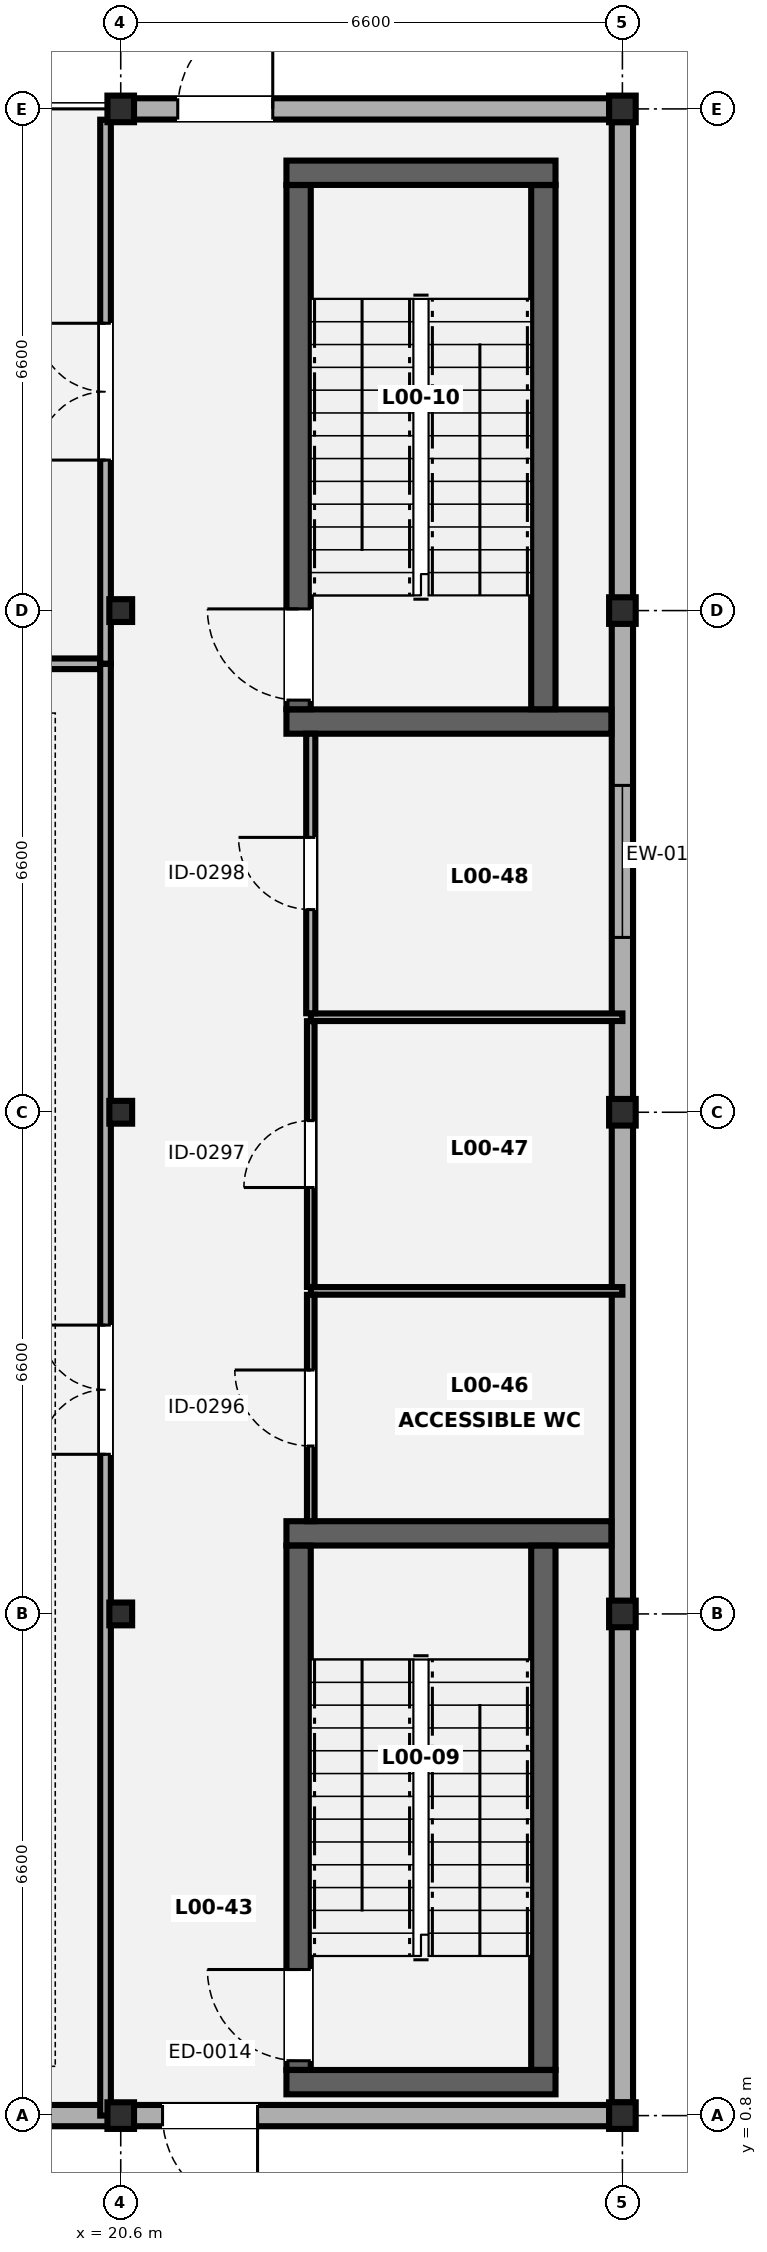
"""IFC4 building model, lengths in metres.
Left out: names, types, materials, properties, quantities, classifications, styles, units other than length and angle.
Written with IfcOpenShell. Run it as: python <this file> out.ifc"""

import sys

from ifc_helpers import new_model, si_unit, direction, frame, frame_2d, origin, origin_2d, place, context, subcontext, project, spatial, rectangle, hollow_rectangle, i_section, extrude, element, fill, save


model = new_model("IFC4")
c1 = context("Model", 3, precision=1e-05, world=origin(), true_north=direction((0.0, 1.0)))
c2 = subcontext(c1, "Body", "Model", "MODEL_VIEW")
j1 = project(units=[si_unit("LENGTHUNIT", "METRE"), si_unit("PLANEANGLEUNIT", "RADIAN")], contexts=[c1])
p1 = place(None, origin())
s1 = spatial("IfcSite", under=j1, at=p1, CompositionType="ELEMENT")
p2 = place(p1, origin())
s2 = spatial("IfcBuilding", under=s1, at=p2, CompositionType="ELEMENT")
p3 = place(p2, origin())
s3 = spatial("IfcBuildingStorey", under=s2, at=p3, CompositionType="ELEMENT", Elevation=0.0)
p4 = place(p3, frame((20.6, 0.8, 0.0), z_axis=(0.0, 0.0, 1.0), x_axis=(1.0, 0.0, 0.0)))
e1 = element("IfcColumn", 1, at=p4, inside=s3, PredefinedType="COLUMN", context=c2, shape_type="SweptSolid", body=[
    extrude(i_section(OverallWidth=0.35, OverallDepth=0.35, WebThickness=0.02, FlangeThickness=0.032, FilletRadius=0.016, at=origin_2d()), origin(), (0.0, 0.0, 1.0), 4.9),
])
for number, where, z_axis, x_axis in (
    (2, (20.6, 7.4, 0.0), (0.0, 0.0, 1.0), (1.0, 0.0, 0.0)),
    (3, (20.6, 14.0, 0.0), (0.0, 0.0, 1.0), (1.0, 0.0, 0.0)),
    (4, (20.6, 20.6, 0.0), (0.0, 0.0, 1.0), (1.0, 0.0, 0.0)),
):
    element("IfcColumn", number, at=place(p3, frame(where, z_axis=z_axis, x_axis=x_axis)), inside=s3, PredefinedType="COLUMN", context=c2, shape_type="SweptSolid", body=[
        extrude(hollow_rectangle(XDim=0.3, YDim=0.3, WallThickness=0.012, at=origin_2d()), origin(), (0.0, 0.0, 1.0), 4.9),
    ])
for number, where, z_axis, x_axis in (
    (5, (20.6, 27.2, 0.0), (0.0, 0.0, 1.0), (1.0, 0.0, 0.0)),
    (6, (27.2, 0.8, 0.0), (0.0, 0.0, 1.0), (1.0, 0.0, 0.0)),
    (7, (27.2, 7.4, 0.0), (0.0, 0.0, 1.0), (1.0, 0.0, 0.0)),
    (8, (27.2, 14.0, 0.0), (0.0, 0.0, 1.0), (1.0, 0.0, 0.0)),
    (9, (27.2, 20.6, 0.0), (0.0, 0.0, 1.0), (1.0, 0.0, 0.0)),
    (10, (27.2, 27.2, 0.0), (0.0, 0.0, 1.0), (1.0, 0.0, 0.0)),
):
    element("IfcColumn", number, at=place(p3, frame(where, z_axis=z_axis, x_axis=x_axis)), inside=s3, PredefinedType="COLUMN", context=c2, shape_type="SweptSolid", body=[
        extrude(i_section(OverallWidth=0.35, OverallDepth=0.35, WebThickness=0.02, FlangeThickness=0.032, FilletRadius=0.016, at=origin_2d()), origin(), (0.0, 0.0, 1.0), 4.9),
    ])
p5 = place(p3, frame((20.773, 27.2, 0.0), z_axis=(0.0, 0.0, 1.0), x_axis=(1.0, 0.0, 0.0)))
e11 = element("IfcWall", 11, at=p5, inside=s3, PredefinedType="SOLIDWALL", context=c2, shape_type="SweptSolid", body=[
    extrude(rectangle(XDim=6.254, YDim=0.28, at=frame_2d((3.127, 0.0))), origin(), (0.0, 0.0, 1.0), 4.205),
])
p6 = place(p5, frame((0.577, 0.0, 0.0)))
e12 = element("IfcOpeningElement", 12, at=p6, cuts=e11, PredefinedType="OPENING", context=c2, shape_type="SweptSolid", body=[
    extrude(rectangle(XDim=1.25, YDim=2.15, at=frame_2d((0.625, 1.075))), frame((0.0, 0.15, 0.0), z_axis=(0.0, -1.0, 0.0), x_axis=(1.0, 0.0, 0.0)), (0.0, 0.0, 1.0), 0.3),
])
p7 = place(p3, frame((27.2, 27.027, 0.0), z_axis=(0.0, 0.0, 1.0), x_axis=(0.0, -1.0, 0.0)))
e13 = element("IfcWall", 13, at=p7, inside=s3, PredefinedType="SOLIDWALL", context=c2, shape_type="SweptSolid", body=[
    extrude(rectangle(XDim=26.054, YDim=0.28, at=frame_2d((13.027, 0.0))), origin(), (0.0, 0.0, 1.0), 4.145),
])
p8 = place(p7, frame((8.727, 0.0, 0.85)))
e14 = element("IfcOpeningElement", 14, at=p8, cuts=e13, PredefinedType="OPENING", context=c2, shape_type="SweptSolid", body=[
    extrude(rectangle(XDim=2.0, YDim=1.4, at=frame_2d((1.0, 0.7))), frame((0.0, 0.15, 0.0), z_axis=(0.0, -1.0, 0.0), x_axis=(1.0, 0.0, 0.0)), (0.0, 0.0, 1.0), 0.3),
])
p9 = place(p3, frame((27.027, 0.8, 0.0), z_axis=(0.0, 0.0, 1.0), x_axis=(-1.0, 0.0, 0.0)))
e15 = element("IfcWall", 15, at=p9, inside=s3, PredefinedType="SOLIDWALL", context=c2, shape_type="SweptSolid", body=[
    extrude(rectangle(XDim=26.054, YDim=0.28, at=frame_2d((13.027, 0.0))), origin(), (0.0, 0.0, 1.0), 4.205),
])
p10 = place(p9, frame((4.627, 0.0, 0.0)))
e16 = element("IfcOpeningElement", 16, at=p10, cuts=e15, PredefinedType="OPENING", context=c2, shape_type="SweptSolid", body=[
    extrude(rectangle(XDim=1.25, YDim=2.15, at=frame_2d((0.625, 1.075))), frame((0.0, 0.15, 0.0), z_axis=(0.0, -1.0, 0.0), x_axis=(1.0, 0.0, 0.0)), (0.0, 0.0, 1.0), 0.3),
])
p11 = place(p9, frame((10.0, 0.0, 0.85)))
e17 = element("IfcOpeningElement", 17, at=p11, cuts=e15, PredefinedType="OPENING", context=c2, shape_type="SweptSolid", body=[
    extrude(rectangle(XDim=2.7, YDim=1.35, at=frame_2d((1.35, 0.675))), frame((0.0, 0.15, 0.0), z_axis=(0.0, -1.0, 0.0), x_axis=(1.0, 0.0, 0.0)), (0.0, 0.0, 1.0), 0.3),
])
p12 = place(p9, frame((16.5, 0.0, 0.85)))
e18 = element("IfcOpeningElement", 18, at=p12, cuts=e15, PredefinedType="OPENING", context=c2, shape_type="SweptSolid", body=[
    extrude(rectangle(XDim=2.9, YDim=1.35, at=frame_2d((1.45, 0.675))), frame((0.0, 0.15, 0.0), z_axis=(0.0, -1.0, 0.0), x_axis=(1.0, 0.0, 0.0)), (0.0, 0.0, 1.0), 0.3),
])
p13 = place(p3, frame((22.78, 1.24, 0.0), z_axis=(0.0, 0.0, 1.0), x_axis=(1.0, 0.0, 0.0)))
e19 = element("IfcWall", 19, at=p13, inside=s3, PredefinedType="SHEAR", context=c2, shape_type="SweptSolid", body=[
    extrude(rectangle(XDim=3.54, YDim=0.32, at=frame_2d((1.77, 0.0))), origin(), (0.0, 0.0, 1.0), 4.66),
])
p14 = place(p3, frame((22.78, 8.46, 0.0), z_axis=(0.0, 0.0, 1.0), x_axis=(1.0, 0.0, 0.0)))
e20 = element("IfcWall", 20, at=p14, inside=s3, PredefinedType="SHEAR", context=c2, shape_type="SweptSolid", body=[
    extrude(rectangle(XDim=4.275, YDim=0.32, at=frame_2d((2.137, 0.0))), origin(), (0.0, 0.0, 1.0), 4.66),
])
p15 = place(p3, frame((22.94, 1.402, 0.0), z_axis=(0.0, 0.0, 1.0), x_axis=(0.0, 1.0, 0.0)))
e21 = element("IfcWall", 21, at=p15, inside=s3, PredefinedType="SHEAR", context=c2, shape_type="SweptSolid", body=[
    extrude(rectangle(XDim=6.896, YDim=0.32, at=frame_2d((3.448, 0.0))), origin(), (0.0, 0.0, 1.0), 4.66),
])
p16 = place(p15, frame((0.12, 0.0, 0.0)))
e22 = element("IfcOpeningElement", 22, at=p16, cuts=e21, PredefinedType="OPENING", context=c2, shape_type="SweptSolid", body=[
    extrude(rectangle(XDim=1.2, YDim=2.15, at=frame_2d((0.6, 1.075))), frame((0.0, 0.17, 0.0), z_axis=(0.0, -1.0, 0.0), x_axis=(1.0, 0.0, 0.0)), (0.0, 0.0, 1.0), 0.34),
])
p17 = place(p3, frame((26.16, 1.402, 0.0), z_axis=(0.0, 0.0, 1.0), x_axis=(0.0, 1.0, 0.0)))
e23 = element("IfcWall", 23, at=p17, inside=s3, PredefinedType="SHEAR", context=c2, shape_type="SweptSolid", body=[
    extrude(rectangle(XDim=6.896, YDim=0.32, at=frame_2d((3.448, 0.0))), origin(), (0.0, 0.0, 1.0), 4.66),
])
p18 = place(p3, frame((22.78, 19.14, 0.0), z_axis=(0.0, 0.0, 1.0), x_axis=(1.0, 0.0, 0.0)))
e24 = element("IfcWall", 24, at=p18, inside=s3, PredefinedType="SHEAR", context=c2, shape_type="SweptSolid", body=[
    extrude(rectangle(XDim=4.275, YDim=0.32, at=frame_2d((2.137, 0.0))), origin(), (0.0, 0.0, 1.0), 4.66),
])
p19 = place(p3, frame((22.78, 26.36, 0.0), z_axis=(0.0, 0.0, 1.0), x_axis=(1.0, 0.0, 0.0)))
e25 = element("IfcWall", 25, at=p19, inside=s3, PredefinedType="SHEAR", context=c2, shape_type="SweptSolid", body=[
    extrude(rectangle(XDim=3.54, YDim=0.32, at=frame_2d((1.77, 0.0))), origin(), (0.0, 0.0, 1.0), 4.66),
])
p20 = place(p3, frame((22.94, 19.302, 0.0), z_axis=(0.0, 0.0, 1.0), x_axis=(0.0, 1.0, 0.0)))
e26 = element("IfcWall", 26, at=p20, inside=s3, PredefinedType="SHEAR", context=c2, shape_type="SweptSolid", body=[
    extrude(rectangle(XDim=6.896, YDim=0.32, at=frame_2d((3.448, 0.0))), origin(), (0.0, 0.0, 1.0), 4.66),
])
p21 = place(p20, frame((0.12, 0.0, 0.0)))
e27 = element("IfcOpeningElement", 27, at=p21, cuts=e26, PredefinedType="OPENING", context=c2, shape_type="SweptSolid", body=[
    extrude(rectangle(XDim=1.2, YDim=2.15, at=frame_2d((0.6, 1.075))), frame((0.0, 0.17, 0.0), z_axis=(0.0, -1.0, 0.0), x_axis=(1.0, 0.0, 0.0)), (0.0, 0.0, 1.0), 0.34),
])
p22 = place(p3, frame((26.16, 19.302, 0.0), z_axis=(0.0, 0.0, 1.0), x_axis=(0.0, 1.0, 0.0)))
e28 = element("IfcWall", 28, at=p22, inside=s3, PredefinedType="SHEAR", context=c2, shape_type="SweptSolid", body=[
    extrude(rectangle(XDim=6.896, YDim=0.32, at=frame_2d((3.448, 0.0))), origin(), (0.0, 0.0, 1.0), 4.66),
])
p23 = place(p3, frame((0.8, 19.9, 0.0), z_axis=(0.0, 0.0, 1.0), x_axis=(1.0, 0.0, 0.0)))
e29 = element("IfcWall", 29, at=p23, inside=s3, PredefinedType="PARTITIONING", context=c2, shape_type="SweptSolid", body=[
    extrude(rectangle(XDim=19.6, YDim=0.14, at=frame_2d((9.8, 0.0))), origin(), (0.0, 0.0, 1.0), 4.66),
])
p24 = place(p3, frame((20.4, 0.8, 0.0), z_axis=(0.0, 0.0, 1.0), x_axis=(0.0, 1.0, 0.0)))
e30 = element("IfcWall", 30, at=p24, inside=s3, PredefinedType="PARTITIONING", context=c2, shape_type="SweptSolid", body=[
    extrude(rectangle(XDim=19.1, YDim=0.14, at=frame_2d((9.55, 0.0))), origin(), (0.0, 0.0, 1.0), 4.145),
])
p25 = place(p24, frame((8.7, 0.0, 0.0)))
e31 = element("IfcOpeningElement", 31, at=p25, cuts=e30, PredefinedType="OPENING", context=c2, shape_type="SweptSolid", body=[
    extrude(rectangle(XDim=1.7, YDim=2.2, at=frame_2d((0.85, 1.1))), frame((0.0, 0.08, 0.0), z_axis=(0.0, -1.0, 0.0), x_axis=(1.0, 0.0, 0.0)), (0.0, 0.0, 1.0), 0.16),
])
p26 = place(p3, frame((20.4, 19.902, 0.0), z_axis=(0.0, 0.0, 1.0), x_axis=(0.0, 1.0, 0.0)))
e32 = element("IfcWall", 32, at=p26, inside=s3, PredefinedType="PARTITIONING", context=c2, shape_type="SweptSolid", body=[
    extrude(rectangle(XDim=7.156, YDim=0.14, at=frame_2d((3.578, 0.0))), origin(), (0.0, 0.0, 1.0), 4.145),
])
p27 = place(p26, frame((2.678, 0.0, 0.0)))
e33 = element("IfcOpeningElement", 33, at=p27, cuts=e32, PredefinedType="OPENING", context=c2, shape_type="SweptSolid", body=[
    extrude(rectangle(XDim=1.8, YDim=2.2, at=frame_2d((0.9, 1.1))), frame((0.0, 0.08, 0.0), z_axis=(0.0, -1.0, 0.0), x_axis=(1.0, 0.0, 0.0)), (0.0, 0.0, 1.0), 0.16),
])
p28 = place(p3, frame((23.102, 11.65, 0.0), z_axis=(0.0, 0.0, 1.0), x_axis=(1.0, 0.0, 0.0)))
e34 = element("IfcWall", 34, at=p28, inside=s3, PredefinedType="PARTITIONING", context=c2, shape_type="SweptSolid", body=[
    extrude(rectangle(XDim=4.098, YDim=0.1, at=frame_2d((2.049, 0.0))), origin(), (0.0, 0.0, 1.0), 4.66),
])
p29 = place(p3, frame((23.1, 8.62, 0.0), z_axis=(0.0, 0.0, 1.0), x_axis=(0.0, 1.0, 0.0)))
e35 = element("IfcWall", 35, at=p29, inside=s3, PredefinedType="PARTITIONING", context=c2, shape_type="SweptSolid", body=[
    extrude(rectangle(XDim=2.978, YDim=0.1, at=frame_2d((1.489, 0.0))), origin(), (0.0, 0.0, 1.0), 4.66),
])
p30 = place(p29, frame((0.989, 0.0, 0.0)))
e36 = element("IfcOpeningElement", 36, at=p30, cuts=e35, PredefinedType="OPENING", context=c2, shape_type="SweptSolid", body=[
    extrude(rectangle(XDim=1.0, YDim=2.1, at=frame_2d((0.5, 1.05))), frame((0.0, 0.06, 0.0), z_axis=(0.0, -1.0, 0.0), x_axis=(1.0, 0.0, 0.0)), (0.0, 0.0, 1.0), 0.12),
])
p31 = place(p3, frame((23.102, 15.25, 0.0), z_axis=(0.0, 0.0, 1.0), x_axis=(1.0, 0.0, 0.0)))
e37 = element("IfcWall", 37, at=p31, inside=s3, PredefinedType="PARTITIONING", context=c2, shape_type="SweptSolid", body=[
    extrude(rectangle(XDim=4.098, YDim=0.1, at=frame_2d((2.049, 0.0))), origin(), (0.0, 0.0, 1.0), 4.66),
])
p32 = place(p3, frame((23.1, 11.702, 0.0), z_axis=(0.0, 0.0, 1.0), x_axis=(0.0, 1.0, 0.0)))
e38 = element("IfcWall", 38, at=p32, inside=s3, PredefinedType="PARTITIONING", context=c2, shape_type="SweptSolid", body=[
    extrude(rectangle(XDim=3.496, YDim=0.1, at=frame_2d((1.748, 0.0))), origin(), (0.0, 0.0, 1.0), 4.66),
])
p33 = place(p32, frame((1.308, 0.0, 0.0)))
e39 = element("IfcOpeningElement", 39, at=p33, cuts=e38, PredefinedType="OPENING", context=c2, shape_type="SweptSolid", body=[
    extrude(rectangle(XDim=0.88, YDim=2.08, at=frame_2d((0.44, 1.04))), frame((0.0, 0.06, 0.0), z_axis=(0.0, -1.0, 0.0), x_axis=(1.0, 0.0, 0.0)), (0.0, 0.0, 1.0), 0.12),
])
p34 = place(p3, frame((23.1, 15.302, 0.0), z_axis=(0.0, 0.0, 1.0), x_axis=(0.0, 1.0, 0.0)))
e40 = element("IfcWall", 40, at=p34, inside=s3, PredefinedType="PARTITIONING", context=c2, shape_type="SweptSolid", body=[
    extrude(rectangle(XDim=3.678, YDim=0.12, at=frame_2d((1.839, 0.0))), origin(), (0.0, 0.0, 1.0), 4.66),
])
p35 = place(p34, frame((1.364, 0.0, 0.0)))
e41 = element("IfcOpeningElement", 41, at=p35, cuts=e40, PredefinedType="OPENING", context=c2, shape_type="SweptSolid", body=[
    extrude(rectangle(XDim=0.95, YDim=2.1, at=frame_2d((0.475, 1.05))), frame((0.0, 0.07, 0.0), z_axis=(0.0, -1.0, 0.0), x_axis=(1.0, 0.0, 0.0)), (0.0, 0.0, 1.0), 0.14),
])
p36 = place(p8, origin())
e42 = element("IfcWindow", 42, at=p36, inside=s3, PartitioningType="SINGLE_PANEL", PredefinedType="WINDOW", context=c2, shape_type="SweptSolid", body=[
    extrude(rectangle(XDim=2.0, YDim=1.4, at=frame_2d((1.0, 0.7))), frame((0.0, 0.03, 0.0), z_axis=(0.0, -1.0, 0.0), x_axis=(1.0, 0.0, 0.0)), (0.0, 0.0, 1.0), 0.06),
])
fill(e14, e42)
p37 = place(p10, origin())
e43 = element("IfcDoor", 43, at=p37, inside=s3, OperationType="SINGLE_SWING_LEFT", PredefinedType="DOOR", context=c2, shape_type="SweptSolid", body=[
    extrude(rectangle(XDim=1.25, YDim=2.15, at=frame_2d((0.625, 1.075))), frame((0.0, 0.025, 0.0), z_axis=(0.0, -1.0, 0.0), x_axis=(1.0, 0.0, 0.0)), (0.0, 0.0, 1.0), 0.05),
])
fill(e16, e43)
p38 = place(p6, origin())
e44 = element("IfcDoor", 44, at=p38, inside=s3, OperationType="SINGLE_SWING_RIGHT", PredefinedType="DOOR", context=c2, shape_type="SweptSolid", body=[
    extrude(rectangle(XDim=1.25, YDim=2.15, at=frame_2d((0.625, 1.075))), frame((0.0, 0.025, 0.0), z_axis=(0.0, -1.0, 0.0), x_axis=(1.0, 0.0, 0.0)), (0.0, 0.0, 1.0), 0.05),
])
fill(e12, e44)
p39 = place(p16, origin())
e45 = element("IfcDoor", 45, at=p39, inside=s3, OperationType="SINGLE_SWING_RIGHT", PredefinedType="DOOR", context=c2, shape_type="SweptSolid", body=[
    extrude(rectangle(XDim=1.2, YDim=2.15, at=frame_2d((0.6, 1.075))), frame((0.0, 0.025, 0.0), z_axis=(0.0, -1.0, 0.0), x_axis=(1.0, 0.0, 0.0)), (0.0, 0.0, 1.0), 0.05),
])
fill(e22, e45)
p40 = place(p21, origin())
e46 = element("IfcDoor", 46, at=p40, inside=s3, OperationType="SINGLE_SWING_RIGHT", PredefinedType="DOOR", context=c2, shape_type="SweptSolid", body=[
    extrude(rectangle(XDim=1.2, YDim=2.15, at=frame_2d((0.6, 1.075))), frame((0.0, 0.025, 0.0), z_axis=(0.0, -1.0, 0.0), x_axis=(1.0, 0.0, 0.0)), (0.0, 0.0, 1.0), 0.05),
])
fill(e27, e46)
p41 = place(p25, origin())
e47 = element("IfcDoor", 47, at=p41, inside=s3, OperationType="DOUBLE_DOOR_SINGLE_SWING", PredefinedType="DOOR", context=c2, shape_type="SweptSolid", body=[
    extrude(rectangle(XDim=1.7, YDim=2.2, at=frame_2d((0.85, 1.1))), frame((0.0, 0.025, 0.0), z_axis=(0.0, -1.0, 0.0), x_axis=(1.0, 0.0, 0.0)), (0.0, 0.0, 1.0), 0.05),
])
fill(e31, e47)
p42 = place(p27, origin())
e48 = element("IfcDoor", 48, at=p42, inside=s3, OperationType="DOUBLE_DOOR_SINGLE_SWING", PredefinedType="DOOR", context=c2, shape_type="SweptSolid", body=[
    extrude(rectangle(XDim=1.8, YDim=2.2, at=frame_2d((0.9, 1.1))), frame((0.0, 0.025, 0.0), z_axis=(0.0, -1.0, 0.0), x_axis=(1.0, 0.0, 0.0)), (0.0, 0.0, 1.0), 0.05),
])
fill(e33, e48)
p43 = place(p30, origin())
e49 = element("IfcDoor", 49, at=p43, inside=s3, OperationType="SINGLE_SWING_RIGHT", PredefinedType="DOOR", context=c2, shape_type="SweptSolid", body=[
    extrude(rectangle(XDim=1.0, YDim=2.1, at=frame_2d((0.5, 1.05))), frame((0.0, 0.025, 0.0), z_axis=(0.0, -1.0, 0.0), x_axis=(1.0, 0.0, 0.0)), (0.0, 0.0, 1.0), 0.05),
])
fill(e36, e49)
p44 = place(p33, origin())
e50 = element("IfcDoor", 50, at=p44, inside=s3, OperationType="SINGLE_SWING_LEFT", PredefinedType="DOOR", context=c2, shape_type="SweptSolid", body=[
    extrude(rectangle(XDim=0.88, YDim=2.08, at=frame_2d((0.44, 1.04))), frame((0.0, 0.025, 0.0), z_axis=(0.0, -1.0, 0.0), x_axis=(1.0, 0.0, 0.0)), (0.0, 0.0, 1.0), 0.05),
])
fill(e39, e50)
p45 = place(p35, origin())
e51 = element("IfcDoor", 51, at=p45, inside=s3, OperationType="SINGLE_SWING_RIGHT", PredefinedType="DOOR", context=c2, shape_type="SweptSolid", body=[
    extrude(rectangle(XDim=0.95, YDim=2.1, at=frame_2d((0.475, 1.05))), frame((0.0, 0.025, 0.0), z_axis=(0.0, -1.0, 0.0), x_axis=(1.0, 0.0, 0.0)), (0.0, 0.0, 1.0), 0.05),
])
fill(e41, e51)
save(model, sys.argv[1])
